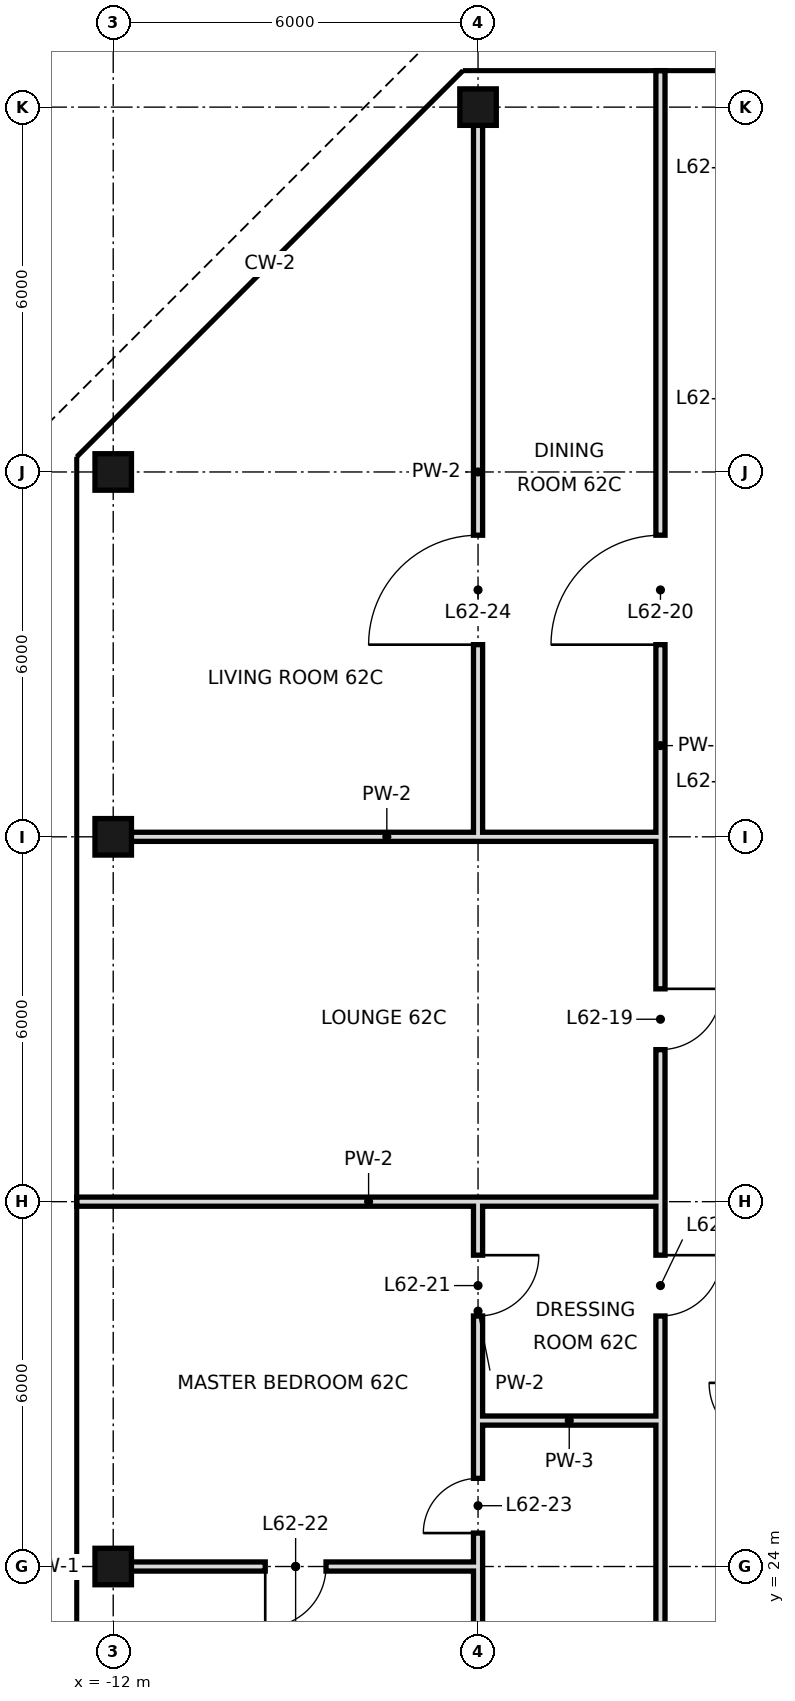
"""IFC4 building model, lengths in metres.
Left out: names, types, materials, properties, quantities, classifications, styles, units other than length and angle.
Written with IfcOpenShell. Run it as: python <this file> out.ifc"""

import sys

from ifc_helpers import new_model, si_unit, direction, frame, frame_2d, origin, origin_2d, place, context, subcontext, project, spatial, rectangle, hollow_rectangle, extrude, element, fill, save


model = new_model("IFC4")
c1 = context("Model", 3, precision=1e-05, world=origin(), true_north=direction((0.0, 1.0)))
c2 = subcontext(c1, "Body", "Model", "MODEL_VIEW")
j1 = project(units=[si_unit("LENGTHUNIT", "METRE"), si_unit("PLANEANGLEUNIT", "RADIAN")], contexts=[c1])
p1 = place(None, origin())
s1 = spatial("IfcSite", under=j1, at=p1, CompositionType="ELEMENT")
p2 = place(p1, origin())
s2 = spatial("IfcBuilding", under=s1, at=p2, CompositionType="ELEMENT")
p3 = place(p2, frame((0.0, 0.0, 263.0)))
s3 = spatial("IfcBuildingStorey", under=s2, at=p3, CompositionType="ELEMENT", Elevation=263.0)
for number, where, z_axis, x_axis in (
    (1, (-12.0, 24.0, 0.0), (0.0, 0.0, 1.0), (1.0, 0.0, 0.0)),
    (2, (-12.0, 36.0, 0.0), (0.0, 0.0, 1.0), (1.0, 0.0, 0.0)),
    (3, (-12.0, 42.0, 0.0), (0.0, 0.0, 1.0), (1.0, 0.0, 0.0)),
    (4, (-6.0, 48.0, 0.0), (0.0, 0.0, 1.0), (1.0, 0.0, 0.0)),
):
    element("IfcColumn", number, at=place(p3, frame(where, z_axis=z_axis, x_axis=x_axis)), inside=s3, PredefinedType="COLUMN", context=c2, shape_type="SweptSolid", body=[
        extrude(hollow_rectangle(XDim=0.6, YDim=0.6, WallThickness=0.028, at=origin_2d()), origin(), (0.0, 0.0, 1.0), 3.6),
    ])
p4 = place(p3, frame((-3.0, 26.4, 0.0), z_axis=(0.0, 0.0, 1.0), x_axis=(0.0, 1.0, 0.0)))
e5 = element("IfcWall", 5, at=p4, inside=s3, PredefinedType="PARTITIONING", context=c2, shape_type="SweptSolid", body=[
    extrude(rectangle(XDim=22.2, YDim=0.15, at=frame_2d((11.1, 0.0))), origin(), (0.0, 0.0, 1.0), 3.42),
])
p5 = place(p4, frame((1.72, 0.0, 0.0)))
e6 = element("IfcOpeningElement", 6, at=p5, cuts=e5, PredefinedType="OPENING", context=c2, shape_type="SweptSolid", body=[
    extrude(rectangle(XDim=1.0, YDim=2.4, at=frame_2d((0.5, 1.2))), frame((0.0, 0.085, 0.0), z_axis=(0.0, -1.0, 0.0), x_axis=(1.0, 0.0, 0.0)), (0.0, 0.0, 1.0), 0.17),
])
p6 = place(p4, frame((6.1, 0.0, 0.0)))
e7 = element("IfcOpeningElement", 7, at=p6, cuts=e5, PredefinedType="OPENING", context=c2, shape_type="SweptSolid", body=[
    extrude(rectangle(XDim=1.0, YDim=2.4, at=frame_2d((0.5, 1.2))), frame((0.0, 0.085, 0.0), z_axis=(0.0, -1.0, 0.0), x_axis=(1.0, 0.0, 0.0)), (0.0, 0.0, 1.0), 0.17),
])
p7 = place(p4, frame((12.76, 0.0, 0.0)))
e8 = element("IfcOpeningElement", 8, at=p7, cuts=e5, PredefinedType="OPENING", context=c2, shape_type="SweptSolid", body=[
    extrude(rectangle(XDim=1.8, YDim=2.4, at=frame_2d((0.9, 1.2))), frame((0.0, 0.085, 0.0), z_axis=(0.0, -1.0, 0.0), x_axis=(1.0, 0.0, 0.0)), (0.0, 0.0, 1.0), 0.17),
])
p8 = place(p3, frame((-3.0, 18.0, 0.0), z_axis=(0.0, 0.0, 1.0), x_axis=(0.0, 1.0, 0.0)))
e9 = element("IfcWall", 9, at=p8, inside=s3, PredefinedType="PARTITIONING", context=c2, shape_type="SweptSolid", body=[
    extrude(rectangle(XDim=8.4, YDim=0.15, at=frame_2d((4.2, 0.0))), origin(), (0.0, 0.0, 1.0), 3.42),
])
p9 = place(p3, frame((-6.0, 26.4, 0.0), z_axis=(0.0, 0.0, 1.0), x_axis=(0.0, 1.0, 0.0)))
e10 = element("IfcWall", 10, at=p9, inside=s3, PredefinedType="PARTITIONING", context=c2, shape_type="SweptSolid", body=[
    extrude(rectangle(XDim=3.6, YDim=0.15, at=frame_2d((1.8, 0.0))), origin(), (0.0, 0.0, 1.0), 3.42),
])
p10 = place(p9, frame((1.72, 0.0, 0.0)))
e11 = element("IfcOpeningElement", 11, at=p10, cuts=e10, PredefinedType="OPENING", context=c2, shape_type="SweptSolid", body=[
    extrude(rectangle(XDim=1.0, YDim=2.4, at=frame_2d((0.5, 1.2))), frame((0.0, 0.085, 0.0), z_axis=(0.0, -1.0, 0.0), x_axis=(1.0, 0.0, 0.0)), (0.0, 0.0, 1.0), 0.17),
])
p11 = place(p3, frame((-6.0, 36.0, 0.0), z_axis=(0.0, 0.0, 1.0), x_axis=(0.0, 1.0, 0.0)))
e12 = element("IfcWall", 12, at=p11, inside=s3, PredefinedType="PARTITIONING", context=c2, shape_type="SweptSolid", body=[
    extrude(rectangle(XDim=12.0, YDim=0.15, at=frame_2d((6.0, 0.0))), origin(), (0.0, 0.0, 1.0), 3.42),
])
p12 = place(p11, frame((3.16, 0.0, 0.0)))
e13 = element("IfcOpeningElement", 13, at=p12, cuts=e12, PredefinedType="OPENING", context=c2, shape_type="SweptSolid", body=[
    extrude(rectangle(XDim=1.8, YDim=2.4, at=frame_2d((0.9, 1.2))), frame((0.0, 0.085, 0.0), z_axis=(0.0, -1.0, 0.0), x_axis=(1.0, 0.0, 0.0)), (0.0, 0.0, 1.0), 0.17),
])
p13 = place(p3, frame((-6.0, 18.0, 0.0), z_axis=(0.0, 0.0, 1.0), x_axis=(0.0, 1.0, 0.0)))
e14 = element("IfcWall", 14, at=p13, inside=s3, PredefinedType="PARTITIONING", context=c2, shape_type="SweptSolid", body=[
    extrude(rectangle(XDim=8.4, YDim=0.15, at=frame_2d((4.2, 0.0))), origin(), (0.0, 0.0, 1.0), 3.42),
])
p14 = place(p13, frame((6.55, 0.0, 0.0)))
e15 = element("IfcOpeningElement", 15, at=p14, cuts=e14, PredefinedType="OPENING", context=c2, shape_type="SweptSolid", body=[
    extrude(rectangle(XDim=0.9, YDim=2.4, at=frame_2d((0.45, 1.2))), frame((0.0, 0.085, 0.0), z_axis=(0.0, -1.0, 0.0), x_axis=(1.0, 0.0, 0.0)), (0.0, 0.0, 1.0), 0.17),
])
p15 = place(p3, frame((-12.0, 24.0, 0.0), z_axis=(0.0, 0.0, 1.0), x_axis=(1.0, 0.0, 0.0)))
e16 = element("IfcWall", 16, at=p15, inside=s3, PredefinedType="PARTITIONING", context=c2, shape_type="SweptSolid", body=[
    extrude(rectangle(XDim=6.0, YDim=0.15, at=frame_2d((3.0, 0.0))), origin(), (0.0, 0.0, 1.0), 2.72),
])
p16 = place(p15, frame((2.5, 0.0, 0.0)))
e17 = element("IfcOpeningElement", 17, at=p16, cuts=e16, PredefinedType="OPENING", context=c2, shape_type="SweptSolid", body=[
    extrude(rectangle(XDim=1.0, YDim=2.4, at=frame_2d((0.5, 1.2))), frame((0.0, 0.085, 0.0), z_axis=(0.0, -1.0, 0.0), x_axis=(1.0, 0.0, 0.0)), (0.0, 0.0, 1.0), 0.17),
])
p17 = place(p3, frame((-6.0, 26.4, 0.0), z_axis=(0.0, 0.0, 1.0), x_axis=(1.0, 0.0, 0.0)))
e18 = element("IfcWall", 18, at=p17, inside=s3, PredefinedType="PARTITIONING", context=c2, shape_type="SweptSolid", body=[
    extrude(rectangle(XDim=3.0, YDim=0.15, at=frame_2d((1.5, 0.0))), origin(), (0.0, 0.0, 1.0), 3.42),
])
p18 = place(p3, frame((-12.6, 30.0, 0.0), z_axis=(0.0, 0.0, 1.0), x_axis=(1.0, 0.0, 0.0)))
e19 = element("IfcWall", 19, at=p18, inside=s3, PredefinedType="PARTITIONING", context=c2, shape_type="SweptSolid", body=[
    extrude(rectangle(XDim=9.6, YDim=0.15, at=frame_2d((4.8, 0.0))), origin(), (0.0, 0.0, 1.0), 2.72),
])
p19 = place(p3, frame((-12.0, 36.0, 0.0), z_axis=(0.0, 0.0, 1.0), x_axis=(1.0, 0.0, 0.0)))
e20 = element("IfcWall", 20, at=p19, inside=s3, PredefinedType="PARTITIONING", context=c2, shape_type="SweptSolid", body=[
    extrude(rectangle(XDim=9.0, YDim=0.15, at=frame_2d((4.5, 0.0))), origin(), (0.0, 0.0, 1.0), 2.72),
])
p20 = place(p5, origin())
e21 = element("IfcDoor", 21, at=p20, inside=s3, OperationType="SINGLE_SWING_RIGHT", PredefinedType="DOOR", context=c2, shape_type="SweptSolid", body=[
    extrude(rectangle(XDim=1.0, YDim=2.4, at=frame_2d((0.5, 1.2))), frame((0.0, 0.025, 0.0), z_axis=(0.0, -1.0, 0.0), x_axis=(1.0, 0.0, 0.0)), (0.0, 0.0, 1.0), 0.05),
])
fill(e6, e21)
p21 = place(p6, origin())
e22 = element("IfcDoor", 22, at=p21, inside=s3, OperationType="SINGLE_SWING_RIGHT", PredefinedType="DOOR", context=c2, shape_type="SweptSolid", body=[
    extrude(rectangle(XDim=1.0, YDim=2.4, at=frame_2d((0.5, 1.2))), frame((0.0, 0.025, 0.0), z_axis=(0.0, -1.0, 0.0), x_axis=(1.0, 0.0, 0.0)), (0.0, 0.0, 1.0), 0.05),
])
fill(e7, e22)
p22 = place(p7, origin())
e23 = element("IfcDoor", 23, at=p22, inside=s3, OperationType="SINGLE_SWING_LEFT", PredefinedType="DOOR", context=c2, shape_type="SweptSolid", body=[
    extrude(rectangle(XDim=1.8, YDim=2.4, at=frame_2d((0.9, 1.2))), frame((0.0, 0.025, 0.0), z_axis=(0.0, -1.0, 0.0), x_axis=(1.0, 0.0, 0.0)), (0.0, 0.0, 1.0), 0.05),
])
fill(e8, e23)
p23 = place(p10, origin())
e24 = element("IfcDoor", 24, at=p23, inside=s3, OperationType="SINGLE_SWING_RIGHT", PredefinedType="DOOR", context=c2, shape_type="SweptSolid", body=[
    extrude(rectangle(XDim=1.0, YDim=2.4, at=frame_2d((0.5, 1.2))), frame((0.0, 0.025, 0.0), z_axis=(0.0, -1.0, 0.0), x_axis=(1.0, 0.0, 0.0)), (0.0, 0.0, 1.0), 0.05),
])
fill(e11, e24)
p24 = place(p16, frame((1.0, 0.0, 0.0), z_axis=(0.0, 0.0, 1.0), x_axis=(-1.0, 0.0, 0.0)))
e25 = element("IfcDoor", 25, at=p24, inside=s3, OperationType="SINGLE_SWING_RIGHT", PredefinedType="DOOR", context=c2, shape_type="SweptSolid", body=[
    extrude(rectangle(XDim=1.0, YDim=2.4, at=frame_2d((0.5, 1.2))), frame((0.0, 0.025, 0.0), z_axis=(0.0, -1.0, 0.0), x_axis=(1.0, 0.0, 0.0)), (0.0, 0.0, 1.0), 0.05),
])
fill(e17, e25)
p25 = place(p14, origin())
e26 = element("IfcDoor", 26, at=p25, inside=s3, OperationType="SINGLE_SWING_LEFT", PredefinedType="DOOR", context=c2, shape_type="SweptSolid", body=[
    extrude(rectangle(XDim=0.9, YDim=2.4, at=frame_2d((0.45, 1.2))), frame((0.0, 0.025, 0.0), z_axis=(0.0, -1.0, 0.0), x_axis=(1.0, 0.0, 0.0)), (0.0, 0.0, 1.0), 0.05),
])
fill(e15, e26)
p26 = place(p12, origin())
e27 = element("IfcDoor", 27, at=p26, inside=s3, OperationType="SINGLE_SWING_LEFT", PredefinedType="DOOR", context=c2, shape_type="SweptSolid", body=[
    extrude(rectangle(XDim=1.8, YDim=2.4, at=frame_2d((0.9, 1.2))), frame((0.0, 0.025, 0.0), z_axis=(0.0, -1.0, 0.0), x_axis=(1.0, 0.0, 0.0)), (0.0, 0.0, 1.0), 0.05),
])
fill(e13, e27)
save(model, sys.argv[1])
